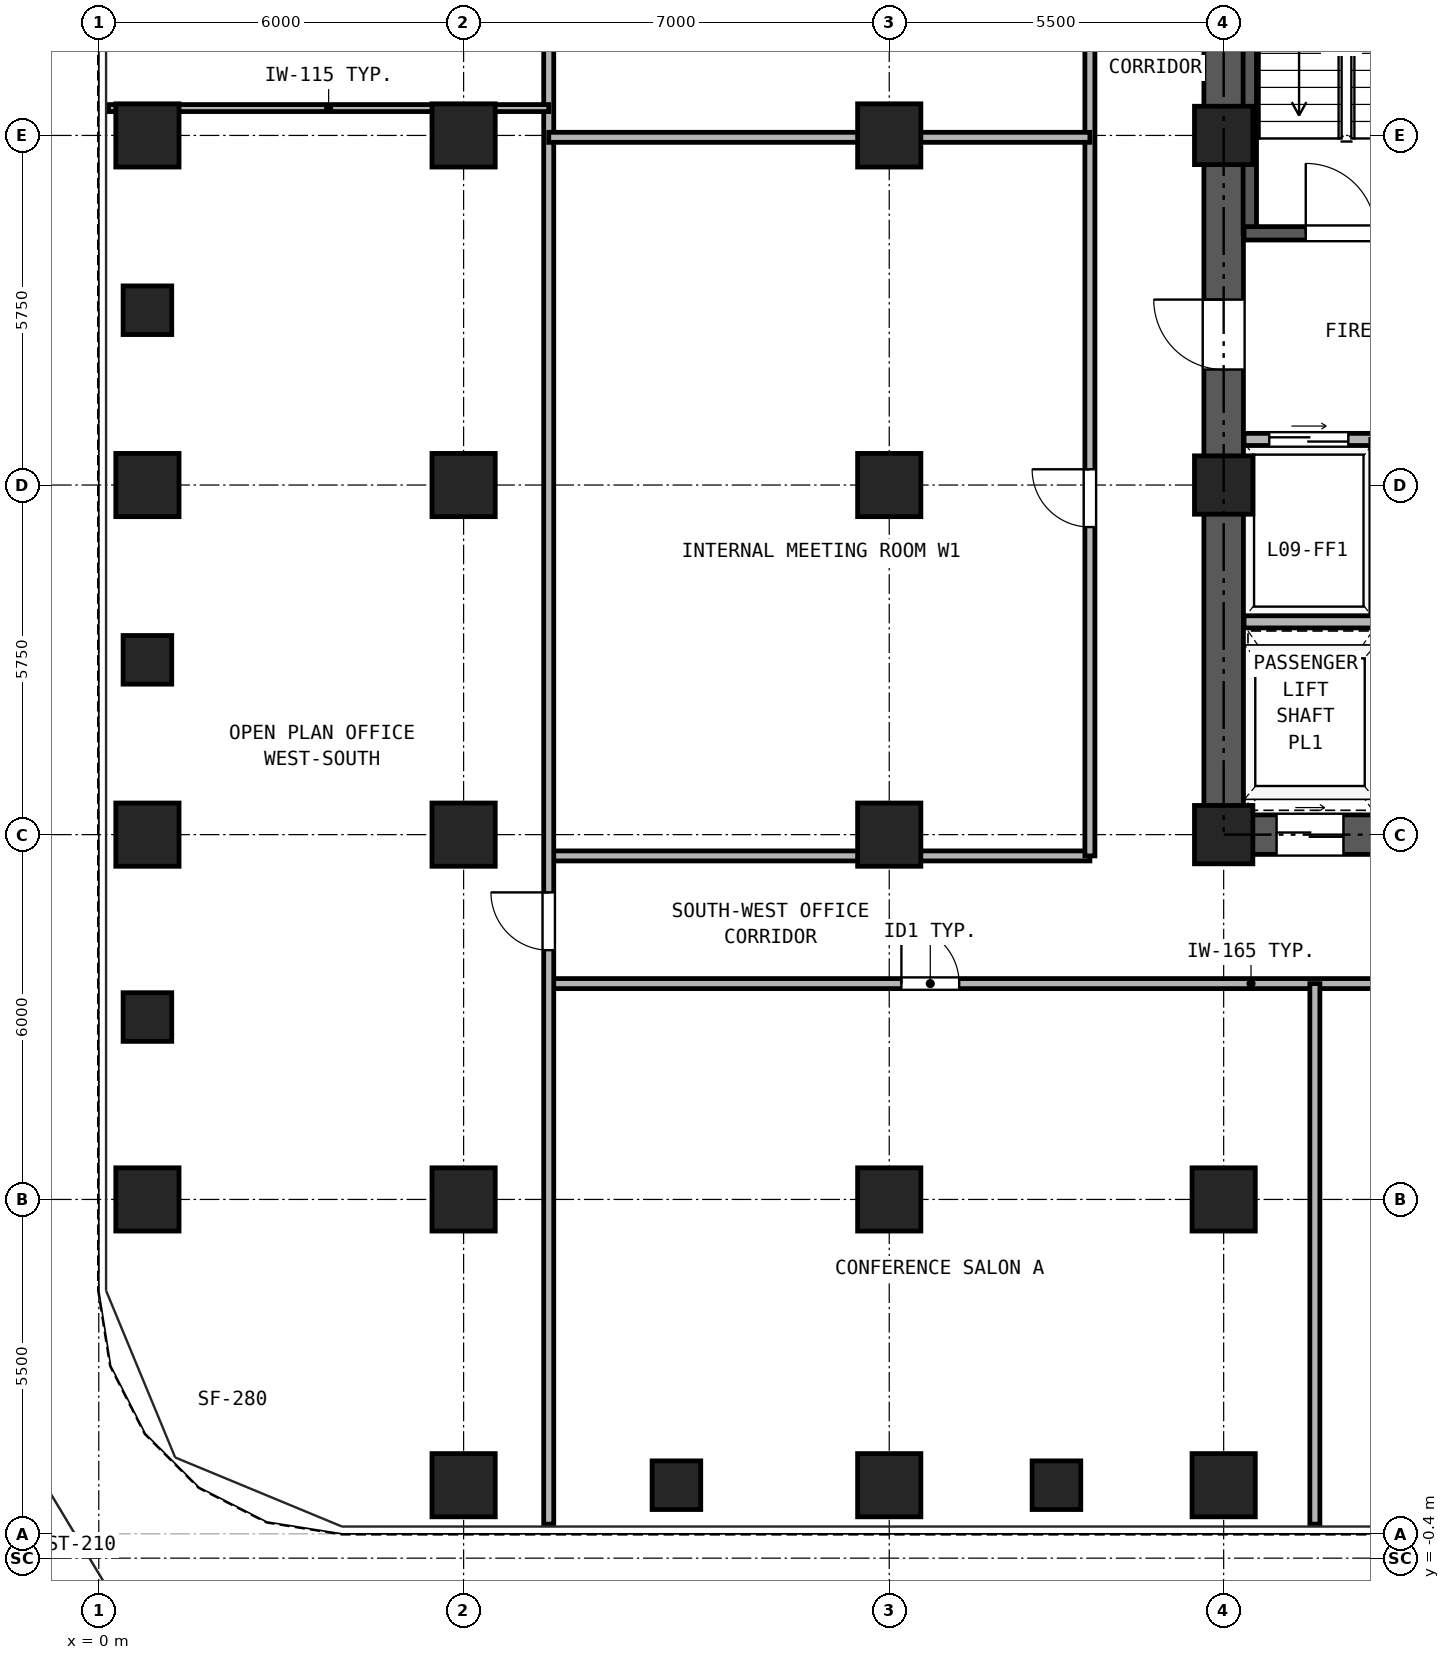
"""IFC4 building model, lengths in metres.
Left out: names, types, materials, properties, quantities, classifications, styles, units other than length and angle.
Written with IfcOpenShell. Run it as: python <this file> out.ifc"""

import sys

from ifc_helpers import new_model, si_unit, direction, frame, frame_2d, origin, origin_2d, place, context, subcontext, project, spatial, rectangle, hollow_rectangle, extrude, source, transform, mapped, element, fill, save


model = new_model("IFC4")
c1 = context("Model", 3, precision=1e-05, world=origin(), true_north=direction((0.0, 1.0)))
c2 = subcontext(c1, "Body", "Model", "MODEL_VIEW")
j1 = project(units=[si_unit("LENGTHUNIT", "METRE"), si_unit("PLANEANGLEUNIT", "RADIAN")], contexts=[c1])
p1 = place(None, origin())
s1 = spatial("IfcSite", under=j1, at=p1, CompositionType="ELEMENT")
p2 = place(p1, origin())
s2 = spatial("IfcBuilding", under=s1, at=p2, CompositionType="ELEMENT")
p3 = place(p2, frame((0.0, 0.0, 36.9)))
s3 = spatial("IfcBuildingStorey", under=s2, at=p3, CompositionType="ELEMENT", Elevation=36.9)
m1 = source(origin(), c2, "Body", "SweptSolid", [
    extrude(hollow_rectangle(XDim=1.04, YDim=1.04, WallThickness=0.065, at=origin_2d()), origin(), (0.0, 0.0, 1.0), 3.32),
])
for number, where, z_axis, x_axis in (
    (1, (6.0, 0.8, 0.0), (0.0, 0.0, 1.0), (1.0, 0.0, 0.0)),
    (2, (13.0, 0.8, 0.0), (0.0, 0.0, 1.0), (1.0, 0.0, 0.0)),
    (3, (18.5, 0.8, 0.0), (0.0, 0.0, 1.0), (1.0, 0.0, 0.0)),
    (4, (0.8, 5.5, 0.0), (0.0, 0.0, 1.0), (1.0, 0.0, 0.0)),
    (5, (0.8, 11.5, 0.0), (0.0, 0.0, 1.0), (1.0, 0.0, 0.0)),
    (6, (0.8, 17.25, 0.0), (0.0, 0.0, 1.0), (1.0, 0.0, 0.0)),
    (7, (0.8, 23.0, 0.0), (0.0, 0.0, 1.0), (1.0, 0.0, 0.0)),
    (8, (6.0, 5.5, 0.0), (0.0, 0.0, 1.0), (1.0, 0.0, 0.0)),
    (9, (6.0, 11.5, 0.0), (0.0, 0.0, 1.0), (1.0, 0.0, 0.0)),
    (10, (6.0, 17.25, 0.0), (0.0, 0.0, 1.0), (1.0, 0.0, 0.0)),
    (11, (6.0, 23.0, 0.0), (0.0, 0.0, 1.0), (1.0, 0.0, 0.0)),
    (12, (13.0, 5.5, 0.0), (0.0, 0.0, 1.0), (1.0, 0.0, 0.0)),
    (13, (13.0, 11.5, 0.0), (0.0, 0.0, 1.0), (1.0, 0.0, 0.0)),
    (14, (13.0, 17.25, 0.0), (0.0, 0.0, 1.0), (1.0, 0.0, 0.0)),
    (15, (13.0, 23.0, 0.0), (0.0, 0.0, 1.0), (1.0, 0.0, 0.0)),
    (16, (18.5, 5.5, 0.0), (0.0, 0.0, 1.0), (1.0, 0.0, 0.0)),
):
    element("IfcColumn", number, at=place(p3, frame(where, z_axis=z_axis, x_axis=x_axis)), inside=s3, PredefinedType="COLUMN", context=c2, shape_type="MappedRepresentation", body=[
        mapped(m1, transform((0.0, 0.0, 0.0), x_axis=(1.0, 0.0, 0.0), y_axis=(0.0, 1.0, 0.0), z_axis=(0.0, 0.0, 1.0), scale=1.0)),
    ])
m2 = source(origin(), c2, "Body", "SweptSolid", [
    extrude(hollow_rectangle(XDim=0.96, YDim=0.96, WallThickness=0.06, at=origin_2d()), origin(), (0.0, 0.0, 1.0), 3.32),
])
for number, where, z_axis, x_axis in (
    (17, (18.5, 11.5, 0.0), (0.0, 0.0, 1.0), (1.0, 0.0, 0.0)),
    (18, (18.5, 17.25, 0.0), (0.0, 0.0, 1.0), (1.0, 0.0, 0.0)),
    (19, (18.5, 23.0, 0.0), (0.0, 0.0, 1.0), (1.0, 0.0, 0.0)),
):
    element("IfcColumn", number, at=place(p3, frame(where, z_axis=z_axis, x_axis=x_axis)), inside=s3, PredefinedType="COLUMN", context=c2, shape_type="MappedRepresentation", body=[
        mapped(m2, transform((0.0, 0.0, 0.0), x_axis=(1.0, 0.0, 0.0), y_axis=(0.0, 1.0, 0.0), z_axis=(0.0, 0.0, 1.0), scale=1.0)),
    ])
m3 = source(origin(), c2, "Body", "SweptSolid", [
    extrude(hollow_rectangle(XDim=0.8, YDim=0.8, WallThickness=0.045, at=origin_2d()), origin(), (0.0, 0.0, 1.0), 3.32),
])
for number, where, z_axis, x_axis in (
    (20, (9.5, 0.8, 0.0), (0.0, 0.0, 1.0), (1.0, 0.0, 0.0)),
    (21, (15.75, 0.8, 0.0), (0.0, 0.0, 1.0), (1.0, 0.0, 0.0)),
    (22, (0.8, 8.5, 0.0), (0.0, 0.0, 1.0), (1.0, 0.0, 0.0)),
    (23, (0.8, 14.375, 0.0), (0.0, 0.0, 1.0), (1.0, 0.0, 0.0)),
    (24, (0.8, 20.125, 0.0), (0.0, 0.0, 1.0), (1.0, 0.0, 0.0)),
):
    element("IfcColumn", number, at=place(p3, frame(where, z_axis=z_axis, x_axis=x_axis)), inside=s3, PredefinedType="COLUMN", context=c2, shape_type="MappedRepresentation", body=[
        mapped(m3, transform((0.0, 0.0, 0.0), x_axis=(1.0, 0.0, 0.0), y_axis=(0.0, 1.0, 0.0), z_axis=(0.0, 0.0, 1.0), scale=1.0)),
    ])
p4 = place(p3, frame((18.175, 11.5, 0.0), z_axis=(0.0, 0.0, 1.0), x_axis=(1.0, 0.0, 0.0)))
e25 = element("IfcWall", 25, at=p4, inside=s3, PredefinedType="SHEAR", context=c2, shape_type="SweptSolid", body=[
    extrude(rectangle(XDim=10.65, YDim=0.65, at=frame_2d((5.325, 0.0))), origin(), (0.0, 0.0, 1.0), 3.32),
])
p5 = place(p4, frame((1.195, 0.0, 0.0)))
e26 = element("IfcOpeningElement", 26, at=p5, cuts=e25, PredefinedType="OPENING", context=c2, shape_type="SweptSolid", body=[
    extrude(rectangle(XDim=1.1, YDim=2.25, at=frame_2d((0.55, 1.125))), frame((0.0, 0.335, 0.0), z_axis=(0.0, -1.0, 0.0), x_axis=(1.0, 0.0, 0.0)), (0.0, 0.0, 1.0), 0.67),
])
p6 = place(p4, frame((3.495, 0.0, 0.0)))
e27 = element("IfcOpeningElement", 27, at=p6, cuts=e25, PredefinedType="OPENING", context=c2, shape_type="SweptSolid", body=[
    extrude(rectangle(XDim=1.1, YDim=2.25, at=frame_2d((0.55, 1.125))), frame((0.0, 0.335, 0.0), z_axis=(0.0, -1.0, 0.0), x_axis=(1.0, 0.0, 0.0)), (0.0, 0.0, 1.0), 0.67),
])
p7 = place(p4, frame((5.925, 0.0, 0.0)))
e28 = element("IfcOpeningElement", 28, at=p7, cuts=e25, PredefinedType="OPENING", context=c2, shape_type="SweptSolid", body=[
    extrude(rectangle(XDim=1.1, YDim=2.25, at=frame_2d((0.55, 1.125))), frame((0.0, 0.335, 0.0), z_axis=(0.0, -1.0, 0.0), x_axis=(1.0, 0.0, 0.0)), (0.0, 0.0, 1.0), 0.67),
])
p8 = place(p4, frame((8.325, 0.0, 0.0)))
e29 = element("IfcOpeningElement", 29, at=p8, cuts=e25, PredefinedType="OPENING", context=c2, shape_type="SweptSolid", body=[
    extrude(rectangle(XDim=1.1, YDim=2.25, at=frame_2d((0.55, 1.125))), frame((0.0, 0.335, 0.0), z_axis=(0.0, -1.0, 0.0), x_axis=(1.0, 0.0, 0.0)), (0.0, 0.0, 1.0), 0.67),
])
p9 = place(p3, frame((18.5, 11.825, 0.0), z_axis=(0.0, 0.0, 1.0), x_axis=(0.0, 1.0, 0.0)))
e30 = element("IfcWall", 30, at=p9, inside=s3, PredefinedType="SHEAR", context=c2, shape_type="SweptSolid", body=[
    extrude(rectangle(XDim=16.6, YDim=0.65, at=frame_2d((8.3, 0.0))), origin(), (0.0, 0.0, 1.0), 3.32),
])
p10 = place(p9, frame((7.325, 0.0, 0.0)))
e31 = element("IfcOpeningElement", 31, at=p10, cuts=e30, PredefinedType="OPENING", context=c2, shape_type="SweptSolid", body=[
    extrude(rectangle(XDim=1.15, YDim=2.2, at=frame_2d((0.575, 1.1))), frame((0.0, 0.335, 0.0), z_axis=(0.0, -1.0, 0.0), x_axis=(1.0, 0.0, 0.0)), (0.0, 0.0, 1.0), 0.67),
])
p11 = place(p3, frame((18.93, 21.39, 0.0), z_axis=(0.0, 0.0, 1.0), x_axis=(0.0, 1.0, 0.0)))
e32 = element("IfcWall", 32, at=p11, inside=s3, PredefinedType="SOLIDWALL", context=c2, shape_type="SweptSolid", body=[
    extrude(rectangle(XDim=7.11, YDim=0.22, at=frame_2d((3.555, 0.0))), origin(), (0.0, 0.0, 1.0), 3.32),
])
p12 = place(p3, frame((18.835, 21.39, 0.0), z_axis=(0.0, 0.0, 1.0), x_axis=(1.0, 0.0, 0.0)))
e33 = element("IfcWall", 33, at=p12, inside=s3, PredefinedType="SOLIDWALL", context=c2, shape_type="SweptSolid", body=[
    extrude(rectangle(XDim=6.295, YDim=0.22, at=frame_2d((3.147, 0.0))), origin(), (0.0, 0.0, 1.0), 3.32),
])
p13 = place(p12, frame((1.015, 0.0, 0.0)))
e34 = element("IfcOpeningElement", 34, at=p13, cuts=e33, PredefinedType="OPENING", context=c2, shape_type="SweptSolid", body=[
    extrude(rectangle(XDim=1.15, YDim=2.2, at=frame_2d((0.575, 1.1))), frame((0.0, 0.12, 0.0), z_axis=(0.0, -1.0, 0.0), x_axis=(1.0, 0.0, 0.0)), (0.0, 0.0, 1.0), 0.24),
])
p14 = place(p12, frame((4.745, 0.0, 0.0)))
e35 = element("IfcOpeningElement", 35, at=p14, cuts=e33, PredefinedType="OPENING", context=c2, shape_type="SweptSolid", body=[
    extrude(rectangle(XDim=1.1, YDim=2.25, at=frame_2d((0.55, 1.125))), frame((0.0, 0.12, 0.0), z_axis=(0.0, -1.0, 0.0), x_axis=(1.0, 0.0, 0.0)), (0.0, 0.0, 1.0), 0.24),
])
p15 = place(p3, frame((18.835, 18.0, 0.0), z_axis=(0.0, 0.0, 1.0), x_axis=(1.0, 0.0, 0.0)))
e36 = element("IfcWall", 36, at=p15, inside=s3, PredefinedType="PARTITIONING", context=c2, shape_type="SweptSolid", body=[
    extrude(rectangle(XDim=9.33, YDim=0.2, at=frame_2d((4.665, 0.0))), origin(), (0.0, 0.0, 1.0), 3.32),
])
p16 = place(p15, frame((0.415, 0.0, 0.0)))
e37 = element("IfcOpeningElement", 37, at=p16, cuts=e36, PredefinedType="OPENING", context=c2, shape_type="SweptSolid", body=[
    extrude(rectangle(XDim=1.3, YDim=2.3, at=frame_2d((0.65, 1.15))), frame((0.0, 0.11, 0.0), z_axis=(0.0, -1.0, 0.0), x_axis=(1.0, 0.0, 0.0)), (0.0, 0.0, 1.0), 0.22),
])
p17 = place(p15, frame((2.515, 0.0, 0.0)))
e38 = element("IfcOpeningElement", 38, at=p17, cuts=e36, PredefinedType="OPENING", context=c2, shape_type="SweptSolid", body=[
    extrude(rectangle(XDim=1.3, YDim=2.3, at=frame_2d((0.65, 1.15))), frame((0.0, 0.11, 0.0), z_axis=(0.0, -1.0, 0.0), x_axis=(1.0, 0.0, 0.0)), (0.0, 0.0, 1.0), 0.22),
])
p18 = place(p15, frame((7.015, 0.0, 0.0)))
e39 = element("IfcOpeningElement", 39, at=p18, cuts=e36, PredefinedType="OPENING", context=c2, shape_type="SweptSolid", body=[
    extrude(rectangle(XDim=1.0, YDim=2.15, at=frame_2d((0.5, 1.075))), frame((0.0, 0.11, 0.0), z_axis=(0.0, -1.0, 0.0), x_axis=(1.0, 0.0, 0.0)), (0.0, 0.0, 1.0), 0.22),
])
p19 = place(p3, frame((18.835, 15.0, 0.0), z_axis=(0.0, 0.0, 1.0), x_axis=(1.0, 0.0, 0.0)))
e40 = element("IfcWall", 40, at=p19, inside=s3, PredefinedType="PARTITIONING", context=c2, shape_type="SweptSolid", body=[
    extrude(rectangle(XDim=9.33, YDim=0.2, at=frame_2d((4.665, 0.0))), origin(), (0.0, 0.0, 1.0), 3.32),
])
p20 = place(p3, frame((7.4, 9.05, 0.0), z_axis=(0.0, 0.0, 1.0), x_axis=(1.0, 0.0, 0.0)))
e41 = element("IfcWall", 41, at=p20, inside=s3, PredefinedType="PARTITIONING", context=c2, shape_type="SweptSolid", body=[
    extrude(rectangle(XDim=32.2, YDim=0.165, at=frame_2d((16.1, 0.0))), origin(), (0.0, 0.0, 1.0), 3.32),
])
p21 = place(p20, frame((5.8, 0.0, 0.0)))
e42 = element("IfcOpeningElement", 42, at=p21, cuts=e41, PredefinedType="OPENING", context=c2, shape_type="SweptSolid", body=[
    extrude(rectangle(XDim=0.95, YDim=2.15, at=frame_2d((0.475, 1.075))), frame((0.0, 0.093, 0.0), z_axis=(0.0, -1.0, 0.0), x_axis=(1.0, 0.0, 0.0)), (0.0, 0.0, 1.0), 0.185),
])
p22 = place(p20, frame((16.35, 0.0, 0.0)))
e43 = element("IfcOpeningElement", 43, at=p22, cuts=e41, PredefinedType="OPENING", context=c2, shape_type="SweptSolid", body=[
    extrude(rectangle(XDim=0.95, YDim=2.15, at=frame_2d((0.475, 1.075))), frame((0.0, 0.093, 0.0), z_axis=(0.0, -1.0, 0.0), x_axis=(1.0, 0.0, 0.0)), (0.0, 0.0, 1.0), 0.185),
])
p23 = place(p20, frame((23.6, 0.0, 0.0)))
e44 = element("IfcOpeningElement", 44, at=p23, cuts=e41, PredefinedType="OPENING", context=c2, shape_type="SweptSolid", body=[
    extrude(rectangle(XDim=0.95, YDim=2.15, at=frame_2d((0.475, 1.075))), frame((0.0, 0.093, 0.0), z_axis=(0.0, -1.0, 0.0), x_axis=(1.0, 0.0, 0.0)), (0.0, 0.0, 1.0), 0.185),
])
p24 = place(p20, frame((27.95, 0.0, 0.0)))
e45 = element("IfcOpeningElement", 45, at=p24, cuts=e41, PredefinedType="OPENING", context=c2, shape_type="SweptSolid", body=[
    extrude(rectangle(XDim=0.92, YDim=2.1, at=frame_2d((0.46, 1.05))), frame((0.0, 0.093, 0.0), z_axis=(0.0, -1.0, 0.0), x_axis=(1.0, 0.0, 0.0)), (0.0, 0.0, 1.0), 0.185),
])
p25 = place(p20, frame((30.5, 0.0, 0.0)))
e46 = element("IfcOpeningElement", 46, at=p25, cuts=e41, PredefinedType="OPENING", context=c2, shape_type="SweptSolid", body=[
    extrude(rectangle(XDim=0.92, YDim=2.1, at=frame_2d((0.46, 1.05))), frame((0.0, 0.093, 0.0), z_axis=(0.0, -1.0, 0.0), x_axis=(1.0, 0.0, 0.0)), (0.0, 0.0, 1.0), 0.185),
])
p26 = place(p3, frame((7.4, 11.15, 0.0), z_axis=(0.0, 0.0, 1.0), x_axis=(1.0, 0.0, 0.0)))
e47 = element("IfcWall", 47, at=p26, inside=s3, PredefinedType="PARTITIONING", context=c2, shape_type="SweptSolid", body=[
    extrude(rectangle(XDim=8.9, YDim=0.165, at=frame_2d((4.45, 0.0))), origin(), (0.0, 0.0, 1.0), 3.32),
])
p27 = place(p3, frame((16.3, 11.15, 0.0), z_axis=(0.0, 0.0, 1.0), x_axis=(0.0, 1.0, 0.0)))
e48 = element("IfcWall", 48, at=p27, inside=s3, PredefinedType="PARTITIONING", context=c2, shape_type="SweptSolid", body=[
    extrude(rectangle(XDim=18.25, YDim=0.165, at=frame_2d((9.125, 0.0))), origin(), (0.0, 0.0, 1.0), 3.32),
])
p28 = place(p27, frame((5.409, 0.0, 0.0)))
e49 = element("IfcOpeningElement", 49, at=p28, cuts=e48, PredefinedType="OPENING", context=c2, shape_type="SweptSolid", body=[
    extrude(rectangle(XDim=0.95, YDim=2.15, at=frame_2d((0.475, 1.075))), frame((0.0, 0.093, 0.0), z_axis=(0.0, -1.0, 0.0), x_axis=(1.0, 0.0, 0.0)), (0.0, 0.0, 1.0), 0.185),
])
p29 = place(p27, frame((14.534, 0.0, 0.0)))
e50 = element("IfcOpeningElement", 50, at=p29, cuts=e48, PredefinedType="OPENING", context=c2, shape_type="SweptSolid", body=[
    extrude(rectangle(XDim=0.95, YDim=2.15, at=frame_2d((0.475, 1.075))), frame((0.0, 0.093, 0.0), z_axis=(0.0, -1.0, 0.0), x_axis=(1.0, 0.0, 0.0)), (0.0, 0.0, 1.0), 0.185),
])
p30 = place(p3, frame((7.4, 0.16, 0.0), z_axis=(0.0, 0.0, 1.0), x_axis=(0.0, 1.0, 0.0)))
e51 = element("IfcWall", 51, at=p30, inside=s3, PredefinedType="PARTITIONING", context=c2, shape_type="SweptSolid", body=[
    extrude(rectangle(XDim=40.18, YDim=0.165, at=frame_2d((20.09, 0.0))), origin(), (0.0, 0.0, 1.0), 3.32),
])
p31 = place(p30, frame((9.44, 0.0, 0.0)))
e52 = element("IfcOpeningElement", 52, at=p31, cuts=e51, PredefinedType="OPENING", context=c2, shape_type="SweptSolid", body=[
    extrude(rectangle(XDim=0.95, YDim=2.15, at=frame_2d((0.475, 1.075))), frame((0.0, 0.093, 0.0), z_axis=(0.0, -1.0, 0.0), x_axis=(1.0, 0.0, 0.0)), (0.0, 0.0, 1.0), 0.185),
])
p32 = place(p30, frame((29.79, 0.0, 0.0)))
e53 = element("IfcOpeningElement", 53, at=p32, cuts=e51, PredefinedType="OPENING", context=c2, shape_type="SweptSolid", body=[
    extrude(rectangle(XDim=0.95, YDim=2.15, at=frame_2d((0.475, 1.075))), frame((0.0, 0.093, 0.0), z_axis=(0.0, -1.0, 0.0), x_axis=(1.0, 0.0, 0.0)), (0.0, 0.0, 1.0), 0.185),
])
p33 = place(p3, frame((20.0, 0.16, 0.0), z_axis=(0.0, 0.0, 1.0), x_axis=(0.0, 1.0, 0.0)))
e54 = element("IfcWall", 54, at=p33, inside=s3, PredefinedType="PARTITIONING", context=c2, shape_type="SweptSolid", body=[
    extrude(rectangle(XDim=8.89, YDim=0.165, at=frame_2d((4.445, 0.0))), origin(), (0.0, 0.0, 1.0), 3.32),
])
p34 = place(p3, frame((0.16, 23.45, 0.0), z_axis=(0.0, 0.0, 1.0), x_axis=(1.0, 0.0, 0.0)))
e55 = element("IfcWall", 55, at=p34, inside=s3, PredefinedType="PARTITIONING", context=c2, shape_type="SweptSolid", body=[
    extrude(rectangle(XDim=7.24, YDim=0.115, at=frame_2d((3.62, 0.0))), origin(), (0.0, 0.0, 1.0), 3.32),
])
p35 = place(p3, frame((7.4, 22.969, 0.0), z_axis=(0.0, 0.0, 1.0), x_axis=(1.0, 0.0, 0.0)))
e56 = element("IfcWall", 56, at=p35, inside=s3, PredefinedType="PARTITIONING", context=c2, shape_type="SweptSolid", body=[
    extrude(rectangle(XDim=8.9, YDim=0.165, at=frame_2d((4.45, 0.0))), origin(), (0.0, 0.0, 1.0), 2.539),
])
p36 = place(p13, frame((1.15, 0.0, 0.0), z_axis=(0.0, 0.0, 1.0), x_axis=(-1.0, 0.0, 0.0)))
e57 = element("IfcDoor", 57, at=p36, inside=s3, OperationType="SINGLE_SWING_LEFT", PredefinedType="DOOR", context=c2, shape_type="SweptSolid", body=[
    extrude(rectangle(XDim=1.15, YDim=2.2, at=frame_2d((0.575, 1.1))), frame((0.0, 0.025, 0.0), z_axis=(0.0, -1.0, 0.0), x_axis=(1.0, 0.0, 0.0)), (0.0, 0.0, 1.0), 0.05),
])
fill(e34, e57)
p37 = place(p16, origin())
e58 = element("IfcDoor", 58, at=p37, inside=s3, OperationType="DOUBLE_DOOR_SLIDING", PredefinedType="DOOR", context=c2, shape_type="SweptSolid", body=[
    extrude(rectangle(XDim=1.3, YDim=2.3, at=frame_2d((0.65, 1.15))), frame((0.0, 0.025, 0.0), z_axis=(0.0, -1.0, 0.0), x_axis=(1.0, 0.0, 0.0)), (0.0, 0.0, 1.0), 0.05),
])
fill(e37, e58)
p38 = place(p10, frame((1.15, 0.0, 0.0), z_axis=(0.0, 0.0, 1.0), x_axis=(-1.0, 0.0, 0.0)))
e59 = element("IfcDoor", 59, at=p38, inside=s3, OperationType="SINGLE_SWING_RIGHT", PredefinedType="DOOR", context=c2, shape_type="SweptSolid", body=[
    extrude(rectangle(XDim=1.15, YDim=2.2, at=frame_2d((0.575, 1.1))), frame((0.0, 0.025, 0.0), z_axis=(0.0, -1.0, 0.0), x_axis=(1.0, 0.0, 0.0)), (0.0, 0.0, 1.0), 0.05),
])
fill(e31, e59)
p39 = place(p5, frame((1.1, 0.0, 0.0), z_axis=(0.0, 0.0, 1.0), x_axis=(-1.0, 0.0, 0.0)))
e60 = element("IfcDoor", 60, at=p39, inside=s3, OperationType="DOUBLE_DOOR_SLIDING", PredefinedType="DOOR", context=c2, shape_type="SweptSolid", body=[
    extrude(rectangle(XDim=1.1, YDim=2.25, at=frame_2d((0.55, 1.125))), frame((0.0, 0.025, 0.0), z_axis=(0.0, -1.0, 0.0), x_axis=(1.0, 0.0, 0.0)), (0.0, 0.0, 1.0), 0.05),
])
fill(e26, e60)
p40 = place(p21, frame((0.95, 0.0, 0.0), z_axis=(0.0, 0.0, 1.0), x_axis=(-1.0, 0.0, 0.0)))
e61 = element("IfcDoor", 61, at=p40, inside=s3, OperationType="SINGLE_SWING_LEFT", PredefinedType="DOOR", context=c2, shape_type="SweptSolid", body=[
    extrude(rectangle(XDim=0.95, YDim=2.15, at=frame_2d((0.475, 1.075))), frame((0.0, 0.025, 0.0), z_axis=(0.0, -1.0, 0.0), x_axis=(1.0, 0.0, 0.0)), (0.0, 0.0, 1.0), 0.05),
])
fill(e42, e61)
p41 = place(p31, frame((0.95, 0.0, 0.0), z_axis=(0.0, 0.0, 1.0), x_axis=(-1.0, 0.0, 0.0)))
e62 = element("IfcDoor", 62, at=p41, inside=s3, OperationType="SINGLE_SWING_RIGHT", PredefinedType="DOOR", context=c2, shape_type="SweptSolid", body=[
    extrude(rectangle(XDim=0.95, YDim=2.15, at=frame_2d((0.475, 1.075))), frame((0.0, 0.025, 0.0), z_axis=(0.0, -1.0, 0.0), x_axis=(1.0, 0.0, 0.0)), (0.0, 0.0, 1.0), 0.05),
])
fill(e52, e62)
p42 = place(p28, frame((0.95, 0.0, 0.0), z_axis=(0.0, 0.0, 1.0), x_axis=(-1.0, 0.0, 0.0)))
e63 = element("IfcDoor", 63, at=p42, inside=s3, OperationType="SINGLE_SWING_RIGHT", PredefinedType="DOOR", context=c2, shape_type="SweptSolid", body=[
    extrude(rectangle(XDim=0.95, YDim=2.15, at=frame_2d((0.475, 1.075))), frame((0.0, 0.025, 0.0), z_axis=(0.0, -1.0, 0.0), x_axis=(1.0, 0.0, 0.0)), (0.0, 0.0, 1.0), 0.05),
])
fill(e49, e63)
save(model, sys.argv[1])
